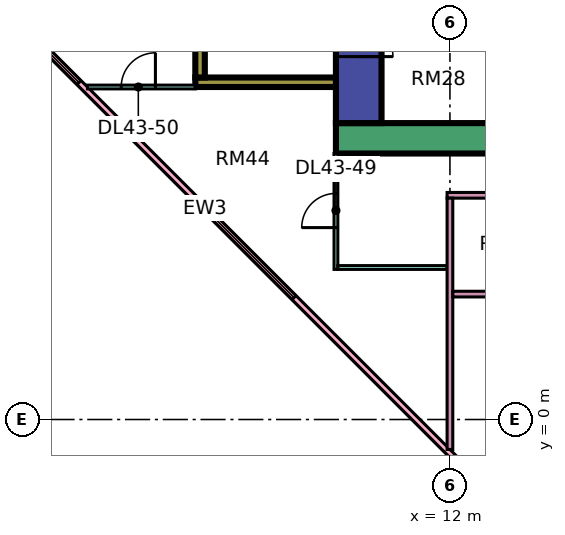
"""IFC4 building model, lengths in metres.
Left out: names, types, materials, properties, quantities, classifications, styles, units other than length and angle.
Written with IfcOpenShell. Run it as: python <this file> out.ifc"""

import sys

from ifc_helpers import new_model, si_unit, direction, frame, frame_2d, origin, place, context, subcontext, project, spatial, rectangle, extrude, element, fill, save


model = new_model("IFC4")
c1 = context("Model", 3, precision=1e-05, world=origin(), true_north=direction((0.0, 1.0)))
c2 = subcontext(c1, "Body", "Model", "MODEL_VIEW")
j1 = project(units=[si_unit("LENGTHUNIT", "METRE"), si_unit("PLANEANGLEUNIT", "RADIAN")], contexts=[c1])
p1 = place(None, origin())
s1 = spatial("IfcSite", under=j1, at=p1, CompositionType="ELEMENT")
p2 = place(p1, origin())
s2 = spatial("IfcBuilding", under=s1, at=p2, CompositionType="ELEMENT")
p3 = place(p2, frame((0.0, 0.0, 187.4)))
s3 = spatial("IfcBuildingStorey", under=s2, at=p3, CompositionType="ELEMENT", Elevation=187.4)
p4 = place(p3, frame((9.0, 7.4, 0.0), z_axis=(0.0, 0.0, 1.0), x_axis=(1.0, 0.0, 0.0)))
e1 = element("IfcWall", 1, at=p4, inside=s3, PredefinedType="SHEAR", context=c2, shape_type="SweptSolid", body=[
    extrude(rectangle(XDim=25.0, YDim=0.8, at=frame_2d((12.5, 0.0))), origin(), (0.0, 0.0, 1.0), 3.75),
])
p5 = place(p3, frame((9.6, 7.8, 0.0), z_axis=(0.0, 0.0, 1.0), x_axis=(0.0, 1.0, 0.0)))
e2 = element("IfcWall", 2, at=p5, inside=s3, PredefinedType="SHEAR", context=c2, shape_type="SweptSolid", body=[
    extrude(rectangle(XDim=11.4, YDim=1.2, at=frame_2d((5.7, 0.0))), origin(), (0.0, 0.0, 1.0), 3.75),
])
p6 = place(p5, frame((4.075, 0.0, 0.0)))
e3 = element("IfcOpeningElement", 3, at=p6, cuts=e2, PredefinedType="OPENING", context=c2, shape_type="SweptSolid", body=[
    extrude(rectangle(XDim=1.1, YDim=2.2, at=frame_2d((0.55, 1.1))), frame((0.0, 0.61, 0.0), z_axis=(0.0, -1.0, 0.0), x_axis=(1.0, 0.0, 0.0)), (0.0, 0.0, 1.0), 1.22),
])
p7 = place(p5, frame((6.575, 0.0, 0.0)))
e4 = element("IfcOpeningElement", 4, at=p7, cuts=e2, PredefinedType="OPENING", context=c2, shape_type="SweptSolid", body=[
    extrude(rectangle(XDim=1.1, YDim=2.2, at=frame_2d((0.55, 1.1))), frame((0.0, 0.61, 0.0), z_axis=(0.0, -1.0, 0.0), x_axis=(1.0, 0.0, 0.0)), (0.0, 0.0, 1.0), 1.22),
])
p8 = place(p5, frame((9.4, 0.0, 0.0)))
e5 = element("IfcOpeningElement", 5, at=p8, cuts=e2, PredefinedType="OPENING", context=c2, shape_type="SweptSolid", body=[
    extrude(rectangle(XDim=1.1, YDim=2.2, at=frame_2d((0.55, 1.1))), frame((0.0, 0.61, 0.0), z_axis=(0.0, -1.0, 0.0), x_axis=(1.0, 0.0, 0.0)), (0.0, 0.0, 1.0), 1.22),
])
p9 = place(p5, frame((1.75, 0.0, 0.0)))
e6 = element("IfcOpeningElement", 6, at=p9, cuts=e2, PredefinedType="OPENING", context=c2, shape_type="SweptSolid", body=[
    extrude(rectangle(XDim=0.9, YDim=2.1, at=frame_2d((0.45, 1.05))), frame((0.0, 0.61, 0.0), z_axis=(0.0, -1.0, 0.0), x_axis=(1.0, 0.0, 0.0)), (0.0, 0.0, 1.0), 1.22),
])
p10 = place(p3, frame((5.3, 8.875, 0.0), z_axis=(0.0, 0.0, 1.0), x_axis=(1.0, 0.0, 0.0)))
e7 = element("IfcWall", 7, at=p10, inside=s3, PredefinedType="SHEAR", context=c2, shape_type="SweptSolid", body=[
    extrude(rectangle(XDim=3.7, YDim=0.25, at=frame_2d((1.85, 0.0))), origin(), (0.0, 0.0, 1.0), 3.75),
])
p11 = place(p3, frame((5.425, 9.0, 0.0), z_axis=(0.0, 0.0, 1.0), x_axis=(0.0, 1.0, 0.0)))
e8 = element("IfcWall", 8, at=p11, inside=s3, PredefinedType="SHEAR", context=c2, shape_type="SweptSolid", body=[
    extrude(rectangle(XDim=4.0, YDim=0.25, at=frame_2d((2.0, 0.0))), origin(), (0.0, 0.0, 1.0), 3.75),
])
p12 = place(p3, frame((-1.447, 12.553, 0.0), z_axis=(0.0, 0.0, 1.0), x_axis=(0.707106781187, -0.707106781187, 0.0)))
e9 = element("IfcWall", 9, at=p12, inside=s3, PredefinedType="SOLIDWALL", context=c2, shape_type="SweptSolid", body=[
    extrude(rectangle(XDim=19.799, YDim=0.15, at=frame_2d((9.899, 0.0))), origin(), (0.0, 0.0, 1.0), 3.35),
])
p13 = place(p12, frame((2.212, 0.0, 0.45)))
e10 = element("IfcOpeningElement", 10, at=p13, cuts=e9, PredefinedType="OPENING", context=c2, shape_type="SweptSolid", body=[
    extrude(rectangle(XDim=3.0, YDim=2.4, at=frame_2d((1.5, 1.2))), frame((0.0, 0.085, 0.0), z_axis=(0.0, -1.0, 0.0), x_axis=(1.0, 0.0, 0.0)), (0.0, 0.0, 1.0), 0.17),
])
p14 = place(p12, frame((10.216, 0.0, 0.45)))
e11 = element("IfcOpeningElement", 11, at=p14, cuts=e9, PredefinedType="OPENING", context=c2, shape_type="SweptSolid", body=[
    extrude(rectangle(XDim=3.0, YDim=2.4, at=frame_2d((1.5, 1.2))), frame((0.0, 0.085, 0.0), z_axis=(0.0, -1.0, 0.0), x_axis=(1.0, 0.0, 0.0)), (0.0, 0.0, 1.0), 0.17),
])
p15 = place(p3, frame((2.461, 8.75, 0.0), z_axis=(0.0, 0.0, 1.0), x_axis=(1.0, 0.0, 0.0)))
e12 = element("IfcWall", 12, at=p15, inside=s3, PredefinedType="PARTITIONING", context=c2, shape_type="SweptSolid", body=[
    extrude(rectangle(XDim=2.839, YDim=0.1, at=frame_2d((1.419, 0.0))), origin(), (0.0, 0.0, 1.0), 3.35),
])
p16 = place(p15, frame((0.889, 0.0, 0.0)))
e13 = element("IfcOpeningElement", 13, at=p16, cuts=e12, PredefinedType="OPENING", context=c2, shape_type="SweptSolid", body=[
    extrude(rectangle(XDim=0.9, YDim=2.1, at=frame_2d((0.45, 1.05))), frame((0.0, 0.06, 0.0), z_axis=(0.0, -1.0, 0.0), x_axis=(1.0, 0.0, 0.0)), (0.0, 0.0, 1.0), 0.12),
])
p17 = place(p3, frame((9.0, 3.95, 0.0), z_axis=(0.0, 0.0, 1.0), x_axis=(0.0, 1.0, 0.0)))
e14 = element("IfcWall", 14, at=p17, inside=s3, PredefinedType="PARTITIONING", context=c2, shape_type="SweptSolid", body=[
    extrude(rectangle(XDim=3.05, YDim=0.1, at=frame_2d((1.525, 0.0))), origin(), (0.0, 0.0, 1.0), 3.35),
])
p18 = place(p17, frame((1.1, 0.0, 0.0)))
e15 = element("IfcOpeningElement", 15, at=p18, cuts=e14, PredefinedType="OPENING", context=c2, shape_type="SweptSolid", body=[
    extrude(rectangle(XDim=0.9, YDim=2.1, at=frame_2d((0.45, 1.05))), frame((0.0, 0.06, 0.0), z_axis=(0.0, -1.0, 0.0), x_axis=(1.0, 0.0, 0.0)), (0.0, 0.0, 1.0), 0.12),
])
p19 = place(p3, frame((9.05, 4.0, 0.0), z_axis=(0.0, 0.0, 1.0), x_axis=(1.0, 0.0, 0.0)))
e16 = element("IfcWall", 16, at=p19, inside=s3, PredefinedType="PARTITIONING", context=c2, shape_type="SweptSolid", body=[
    extrude(rectangle(XDim=2.875, YDim=0.1, at=frame_2d((1.438, 0.0))), origin(), (0.0, 0.0, 1.0), 3.35),
])
p20 = place(p3, frame((11.925, 5.9, 0.0), z_axis=(0.0, 0.0, 1.0), x_axis=(1.0, 0.0, 0.0)))
e17 = element("IfcWall", 17, at=p20, inside=s3, PredefinedType="PARTITIONING", context=c2, shape_type="SweptSolid", body=[
    extrude(rectangle(XDim=21.125, YDim=0.15, at=frame_2d((10.562, 0.0))), origin(), (0.0, 0.0, 1.0), 3.35),
])
p21 = place(p20, frame((16.125, 0.0, 0.0)))
e18 = element("IfcOpeningElement", 18, at=p21, cuts=e17, PredefinedType="OPENING", context=c2, shape_type="SweptSolid", body=[
    extrude(rectangle(XDim=0.9, YDim=2.1, at=frame_2d((0.45, 1.05))), frame((0.0, 0.085, 0.0), z_axis=(0.0, -1.0, 0.0), x_axis=(1.0, 0.0, 0.0)), (0.0, 0.0, 1.0), 0.17),
])
p22 = place(p20, frame((4.125, 0.0, 0.0)))
e19 = element("IfcOpeningElement", 19, at=p22, cuts=e17, PredefinedType="OPENING", context=c2, shape_type="SweptSolid", body=[
    extrude(rectangle(XDim=0.9, YDim=2.1, at=frame_2d((0.45, 1.05))), frame((0.0, 0.085, 0.0), z_axis=(0.0, -1.0, 0.0), x_axis=(1.0, 0.0, 0.0)), (0.0, 0.0, 1.0), 0.17),
])
p23 = place(p20, frame((10.125, 0.0, 0.0)))
e20 = element("IfcOpeningElement", 20, at=p23, cuts=e17, PredefinedType="OPENING", context=c2, shape_type="SweptSolid", body=[
    extrude(rectangle(XDim=0.9, YDim=2.1, at=frame_2d((0.45, 1.05))), frame((0.0, 0.085, 0.0), z_axis=(0.0, -1.0, 0.0), x_axis=(1.0, 0.0, 0.0)), (0.0, 0.0, 1.0), 0.17),
])
p24 = place(p3, frame((12.0, -0.788, 0.0), z_axis=(0.0, 0.0, 1.0), x_axis=(0.0, 1.0, 0.0)))
e21 = element("IfcWall", 21, at=p24, inside=s3, PredefinedType="PARTITIONING", context=c2, shape_type="SweptSolid", body=[
    extrude(rectangle(XDim=6.613, YDim=0.15, at=frame_2d((3.306, 0.0))), origin(), (0.0, 0.0, 1.0), 3.35),
])
p25 = place(p3, frame((12.075, 3.3, 0.0), z_axis=(0.0, 0.0, 1.0), x_axis=(1.0, 0.0, 0.0)))
e22 = element("IfcWall", 22, at=p25, inside=s3, PredefinedType="PARTITIONING", context=c2, shape_type="SweptSolid", body=[
    extrude(rectangle(XDim=3.0, YDim=0.15, at=frame_2d((1.5, 0.0))), origin(), (0.0, 0.0, 1.0), 3.35),
])
p26 = place(p13, origin())
e23 = element("IfcWindow", 23, at=p26, inside=s3, PartitioningType="SINGLE_PANEL", PredefinedType="WINDOW", context=c2, shape_type="SweptSolid", body=[
    extrude(rectangle(XDim=3.0, YDim=2.4, at=frame_2d((1.5, 1.2))), frame((0.0, 0.03, 0.0), z_axis=(0.0, -1.0, 0.0), x_axis=(1.0, 0.0, 0.0)), (0.0, 0.0, 1.0), 0.06),
])
fill(e10, e23)
p27 = place(p14, origin())
e24 = element("IfcWindow", 24, at=p27, inside=s3, PartitioningType="SINGLE_PANEL", PredefinedType="WINDOW", context=c2, shape_type="SweptSolid", body=[
    extrude(rectangle(XDim=3.0, YDim=2.4, at=frame_2d((1.5, 1.2))), frame((0.0, 0.03, 0.0), z_axis=(0.0, -1.0, 0.0), x_axis=(1.0, 0.0, 0.0)), (0.0, 0.0, 1.0), 0.06),
])
fill(e11, e24)
p28 = place(p9, frame((0.9, 0.0, 0.0), z_axis=(0.0, 0.0, 1.0), x_axis=(-1.0, 0.0, 0.0)))
e25 = element("IfcDoor", 25, at=p28, inside=s3, OperationType="SINGLE_SWING_LEFT", PredefinedType="DOOR", context=c2, shape_type="SweptSolid", body=[
    extrude(rectangle(XDim=0.9, YDim=2.1, at=frame_2d((0.45, 1.05))), frame((0.0, 0.025, 0.0), z_axis=(0.0, -1.0, 0.0), x_axis=(1.0, 0.0, 0.0)), (0.0, 0.0, 1.0), 0.05),
])
fill(e6, e25)
p29 = place(p18, origin())
e26 = element("IfcDoor", 26, at=p29, inside=s3, OperationType="SINGLE_SWING_LEFT", PredefinedType="DOOR", context=c2, shape_type="SweptSolid", body=[
    extrude(rectangle(XDim=0.9, YDim=2.1, at=frame_2d((0.45, 1.05))), frame((0.0, 0.025, 0.0), z_axis=(0.0, -1.0, 0.0), x_axis=(1.0, 0.0, 0.0)), (0.0, 0.0, 1.0), 0.05),
])
fill(e15, e26)
p30 = place(p16, frame((0.9, 0.0, 0.0), z_axis=(0.0, 0.0, 1.0), x_axis=(-1.0, 0.0, 0.0)))
e27 = element("IfcDoor", 27, at=p30, inside=s3, OperationType="SINGLE_SWING_RIGHT", PredefinedType="DOOR", context=c2, shape_type="SweptSolid", body=[
    extrude(rectangle(XDim=0.9, YDim=2.1, at=frame_2d((0.45, 1.05))), frame((0.0, 0.025, 0.0), z_axis=(0.0, -1.0, 0.0), x_axis=(1.0, 0.0, 0.0)), (0.0, 0.0, 1.0), 0.05),
])
fill(e13, e27)
save(model, sys.argv[1])
